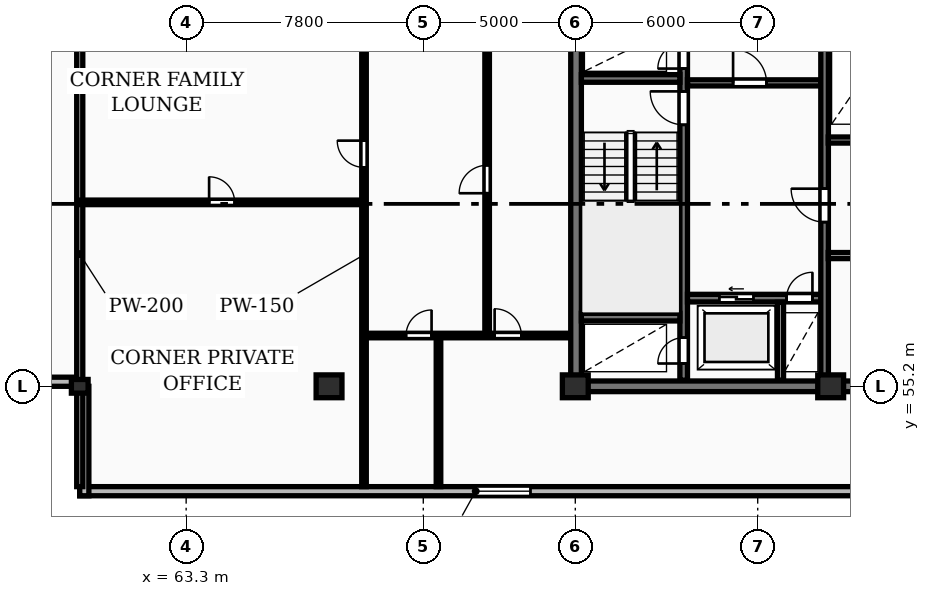
"""IFC4 building model, lengths in metres.
Left out: names, types, materials, properties, quantities, classifications, styles, units other than length and angle.
Written with IfcOpenShell. Run it as: python <this file> out.ifc"""

import sys

from ifc_helpers import new_model, si_unit, direction, frame, frame_2d, origin, origin_2d, place, context, subcontext, project, spatial, rectangle, extrude, element, fill, save


model = new_model("IFC4")
c1 = context("Model", 3, precision=1e-05, world=origin(), true_north=direction((0.0, 1.0)))
c2 = subcontext(c1, "Body", "Model", "MODEL_VIEW")
j1 = project(units=[si_unit("LENGTHUNIT", "METRE"), si_unit("PLANEANGLEUNIT", "RADIAN")], contexts=[c1])
p1 = place(None, origin())
s1 = spatial("IfcSite", under=j1, at=p1, CompositionType="ELEMENT")
p2 = place(p1, origin())
s2 = spatial("IfcBuilding", under=s1, at=p2, CompositionType="ELEMENT")
p3 = place(p2, frame((0.0, 0.0, 207.6)))
s3 = spatial("IfcBuildingStorey", under=s2, at=p3, CompositionType="ELEMENT", Elevation=207.6)
p4 = place(p3, frame((59.8, 55.2, 0.0), z_axis=(0.0, 0.0, 1.0), x_axis=(1.0, 0.0, 0.0)))
e1 = element("IfcColumn", 1, at=p4, inside=s3, PredefinedType="PILASTER", context=c2, shape_type="SweptSolid", body=[
    extrude(rectangle(XDim=0.55, YDim=0.45, at=origin_2d()), origin(), (0.0, 0.0, 1.0), 3.25),
])
for number, where, z_axis, x_axis in (
    (2, (68.0, 55.2, 0.0), (0.0, 0.0, 1.0), (1.0, 0.0, 0.0)),
    (3, (76.1, 55.2, 0.0), (0.0, 0.0, 1.0), (1.0, 0.0, 0.0)),
    (4, (84.5, 55.2, 0.0), (0.0, 0.0, 1.0), (1.0, 0.0, 0.0)),
):
    element("IfcColumn", number, at=place(p3, frame(where, z_axis=z_axis, x_axis=x_axis)), inside=s3, PredefinedType="COLUMN", context=c2, shape_type="SweptSolid", body=[
        extrude(rectangle(XDim=0.85, YDim=0.75, at=origin_2d()), origin(), (0.0, 0.0, 1.0), 3.25),
    ])
p5 = place(p3, frame((59.8, 51.75, 0.0), z_axis=(0.0, 0.0, 1.0), x_axis=(1.0, 0.0, 0.0)))
e5 = element("IfcWall", 5, at=p5, inside=s3, PredefinedType="STANDARD", context=c2, shape_type="SweptSolid", body=[
    extrude(rectangle(XDim=68.6, YDim=0.3, at=frame_2d((34.3, 0.0))), origin(), (0.0, 0.0, 1.0), 2.97),
])
p6 = place(p5, frame((13.025, 0.0, 0.85)))
e6 = element("IfcOpeningElement", 6, at=p6, cuts=e5, PredefinedType="OPENING", context=c2, shape_type="SweptSolid", body=[
    extrude(rectangle(XDim=1.8, YDim=1.8, at=frame_2d((0.9, 0.9))), frame((0.0, 0.16, 0.0), z_axis=(0.0, -1.0, 0.0), x_axis=(1.0, 0.0, 0.0)), (0.0, 0.0, 1.0), 0.32),
])
p7 = place(p5, frame((56.375, 0.0, 0.85)))
e7 = element("IfcOpeningElement", 7, at=p7, cuts=e5, PredefinedType="OPENING", context=c2, shape_type="SweptSolid", body=[
    extrude(rectangle(XDim=1.8, YDim=1.8, at=frame_2d((0.9, 0.9))), frame((0.0, 0.16, 0.0), z_axis=(0.0, -1.0, 0.0), x_axis=(1.0, 0.0, 0.0)), (0.0, 0.0, 1.0), 0.32),
])
p8 = place(p3, frame((56.2, 55.35, 0.0), z_axis=(0.0, 0.0, 1.0), x_axis=(1.0, 0.0, 0.0)))
e8 = element("IfcWall", 8, at=p8, inside=s3, PredefinedType="STANDARD", context=c2, shape_type="SweptSolid", body=[
    extrude(rectangle(XDim=3.6, YDim=0.3, at=frame_2d((1.8, 0.0))), origin(), (0.0, 0.0, 1.0), 2.97),
])
p9 = place(p3, frame((59.95, 55.2, 0.0), z_axis=(0.0, 0.0, 1.0), x_axis=(0.0, -1.0, 0.0)))
e9 = element("IfcWall", 9, at=p9, inside=s3, PredefinedType="STANDARD", context=c2, shape_type="SweptSolid", body=[
    extrude(rectangle(XDim=3.6, YDim=0.3, at=frame_2d((1.8, 0.0))), origin(), (0.0, 0.0, 1.0), 2.97),
])
p10 = place(p3, frame((75.95, 55.2, 0.0), z_axis=(0.0, 0.0, 1.0), x_axis=(1.0, 0.0, 0.0)))
e10 = element("IfcWall", 10, at=p10, inside=s3, PredefinedType="SHEAR", context=c2, shape_type="SweptSolid", body=[
    extrude(rectangle(XDim=36.3, YDim=0.35, at=frame_2d((18.15, 0.0))), origin(), (0.0, 0.0, 1.0), 3.25),
])
p11 = place(p3, frame((76.125, 55.375, 0.0), z_axis=(0.0, 0.0, 1.0), x_axis=(0.0, 1.0, 0.0)))
e11 = element("IfcWall", 11, at=p11, inside=s3, PredefinedType="SHEAR", context=c2, shape_type="SweptSolid", body=[
    extrude(rectangle(XDim=11.65, YDim=0.35, at=frame_2d((5.825, 0.0))), origin(), (0.0, 0.0, 1.0), 3.25),
])
p12 = place(p3, frame((79.665, 55.4, 0.0), z_axis=(0.0, 0.0, 1.0), x_axis=(0.0, 1.0, 0.0)))
e12 = element("IfcWall", 12, at=p12, inside=s3, PredefinedType="SHEAR", context=c2, shape_type="SweptSolid", body=[
    extrude(rectangle(XDim=11.6, YDim=0.25, at=frame_2d((5.8, 0.0))), origin(), (0.0, 0.0, 1.0), 3.25),
])
p13 = place(p12, frame((0.55, 0.0, 0.0)))
e13 = element("IfcOpeningElement", 13, at=p13, cuts=e12, PredefinedType="OPENING", context=c2, shape_type="SweptSolid", body=[
    extrude(rectangle(XDim=0.85, YDim=2.05, at=frame_2d((0.425, 1.025))), frame((0.0, 0.135, 0.0), z_axis=(0.0, -1.0, 0.0), x_axis=(1.0, 0.0, 0.0)), (0.0, 0.0, 1.0), 0.27),
])
p14 = place(p12, frame((8.4, 0.0, 0.0)))
e14 = element("IfcOpeningElement", 14, at=p14, cuts=e12, PredefinedType="OPENING", context=c2, shape_type="SweptSolid", body=[
    extrude(rectangle(XDim=1.1, YDim=2.1, at=frame_2d((0.55, 1.05))), frame((0.0, 0.135, 0.0), z_axis=(0.0, -1.0, 0.0), x_axis=(1.0, 0.0, 0.0)), (0.0, 0.0, 1.0), 0.27),
])
p15 = place(p12, frame((10.25, 0.0, 0.0)))
e15 = element("IfcOpeningElement", 15, at=p15, cuts=e12, PredefinedType="OPENING", context=c2, shape_type="SweptSolid", body=[
    extrude(rectangle(XDim=0.85, YDim=2.05, at=frame_2d((0.425, 1.025))), frame((0.0, 0.135, 0.0), z_axis=(0.0, -1.0, 0.0), x_axis=(1.0, 0.0, 0.0)), (0.0, 0.0, 1.0), 0.27),
])
for number, where, z_axis, x_axis in (
    (16, (76.3, 57.475, 0.0), (0.0, 0.0, 1.0), (1.0, 0.0, 0.0)),
    (17, (76.3, 65.325, 0.0), (0.0, 0.0, 1.0), (1.0, 0.0, 0.0)),
):
    element("IfcWall", number, at=place(p3, frame(where, z_axis=z_axis, x_axis=x_axis)), inside=s3, PredefinedType="SHEAR", context=c2, shape_type="SweptSolid", body=[
        extrude(rectangle(XDim=3.24, YDim=0.25, at=frame_2d((1.62, 0.0))), origin(), (0.0, 0.0, 1.0), 3.25),
    ])
p16 = place(p3, frame((79.79, 58.1, 0.0), z_axis=(0.0, 0.0, 1.0), x_axis=(1.0, 0.0, 0.0)))
e18 = element("IfcWall", 18, at=p16, inside=s3, PredefinedType="SHEAR", context=c2, shape_type="SweptSolid", body=[
    extrude(rectangle(XDim=4.39, YDim=0.25, at=frame_2d((2.195, 0.0))), origin(), (0.0, 0.0, 1.0), 3.25),
])
p17 = place(p16, frame((1.05, 0.0, 0.0)))
e19 = element("IfcOpeningElement", 19, at=p17, cuts=e18, PredefinedType="OPENING", context=c2, shape_type="SweptSolid", body=[
    extrude(rectangle(XDim=1.12, YDim=2.12, at=frame_2d((0.56, 1.06))), frame((0.0, 0.135, 0.0), z_axis=(0.0, -1.0, 0.0), x_axis=(1.0, 0.0, 0.0)), (0.0, 0.0, 1.0), 0.27),
])
p18 = place(p16, frame((3.26, 0.0, 0.0)))
e20 = element("IfcOpeningElement", 20, at=p18, cuts=e18, PredefinedType="OPENING", context=c2, shape_type="SweptSolid", body=[
    extrude(rectangle(XDim=0.85, YDim=2.05, at=frame_2d((0.425, 1.025))), frame((0.0, 0.135, 0.0), z_axis=(0.0, -1.0, 0.0), x_axis=(1.0, 0.0, 0.0)), (0.0, 0.0, 1.0), 0.27),
])
p19 = place(p3, frame((82.85, 55.4, 0.0), z_axis=(0.0, 0.0, 1.0), x_axis=(0.0, 1.0, 0.0)))
e21 = element("IfcWall", 21, at=p19, inside=s3, PredefinedType="PARTITIONING", context=c2, shape_type="SweptSolid", body=[
    extrude(rectangle(XDim=2.56, YDim=0.2, at=frame_2d((1.28, 0.0))), origin(), (0.0, 0.0, 1.0), 2.97),
])
p20 = place(p3, frame((79.79, 65.18, 0.0), z_axis=(0.0, 0.0, 1.0), x_axis=(1.0, 0.0, 0.0)))
e22 = element("IfcWall", 22, at=p20, inside=s3, PredefinedType="PARTITIONING", context=c2, shape_type="SweptSolid", body=[
    extrude(rectangle(XDim=4.39, YDim=0.2, at=frame_2d((2.195, 0.0))), origin(), (0.0, 0.0, 1.0), 2.97),
])
p21 = place(p20, frame((1.5, 0.0, 0.0)))
e23 = element("IfcOpeningElement", 23, at=p21, cuts=e22, PredefinedType="OPENING", context=c2, shape_type="SweptSolid", body=[
    extrude(rectangle(XDim=1.1, YDim=2.1, at=frame_2d((0.55, 1.05))), frame((0.0, 0.11, 0.0), z_axis=(0.0, -1.0, 0.0), x_axis=(1.0, 0.0, 0.0)), (0.0, 0.0, 1.0), 0.22),
])
p22 = place(p3, frame((84.3, 55.4, 0.0), z_axis=(0.0, 0.0, 1.0), x_axis=(0.0, 1.0, 0.0)))
e24 = element("IfcWall", 24, at=p22, inside=s3, PredefinedType="SHEAR", context=c2, shape_type="SweptSolid", body=[
    extrude(rectangle(XDim=11.6, YDim=0.25, at=frame_2d((5.8, 0.0))), origin(), (0.0, 0.0, 1.0), 3.25),
])
p23 = place(p22, frame((5.2, 0.0, 0.0)))
e25 = element("IfcOpeningElement", 25, at=p23, cuts=e24, PredefinedType="OPENING", context=c2, shape_type="SweptSolid", body=[
    extrude(rectangle(XDim=1.1, YDim=2.1, at=frame_2d((0.55, 1.05))), frame((0.0, 0.135, 0.0), z_axis=(0.0, -1.0, 0.0), x_axis=(1.0, 0.0, 0.0)), (0.0, 0.0, 1.0), 0.27),
])
p24 = place(p3, frame((84.42, 59.5, 0.0), z_axis=(0.0, 0.0, 1.0), x_axis=(1.0, 0.0, 0.0)))
e26 = element("IfcWall", 26, at=p24, inside=s3, PredefinedType="PARTITIONING", context=c2, shape_type="SweptSolid", body=[
    extrude(rectangle(XDim=8.36, YDim=0.2, at=frame_2d((4.18, 0.0))), origin(), (0.0, 0.0, 1.0), 2.97),
])
p25 = place(p24, frame((3.4, 0.0, 0.0)))
e27 = element("IfcOpeningElement", 27, at=p25, cuts=e26, PredefinedType="OPENING", context=c2, shape_type="SweptSolid", body=[
    extrude(rectangle(XDim=0.92, YDim=2.08, at=frame_2d((0.46, 1.04))), frame((0.0, 0.11, 0.0), z_axis=(0.0, -1.0, 0.0), x_axis=(1.0, 0.0, 0.0)), (0.0, 0.0, 1.0), 0.22),
])
p26 = place(p3, frame((84.42, 63.3, 0.0), z_axis=(0.0, 0.0, 1.0), x_axis=(1.0, 0.0, 0.0)))
e28 = element("IfcWall", 28, at=p26, inside=s3, PredefinedType="PARTITIONING", context=c2, shape_type="SweptSolid", body=[
    extrude(rectangle(XDim=19.83, YDim=0.2, at=frame_2d((9.915, 0.0))), origin(), (0.0, 0.0, 1.0), 2.97),
])
p27 = place(p26, frame((1.15, 0.0, 0.0)))
e29 = element("IfcOpeningElement", 29, at=p27, cuts=e28, PredefinedType="OPENING", context=c2, shape_type="SweptSolid", body=[
    extrude(rectangle(XDim=0.85, YDim=2.05, at=frame_2d((0.425, 1.025))), frame((0.0, 0.11, 0.0), z_axis=(0.0, -1.0, 0.0), x_axis=(1.0, 0.0, 0.0)), (0.0, 0.0, 1.0), 0.22),
])
p28 = place(p26, frame((3.25, 0.0, 0.0)))
e30 = element("IfcOpeningElement", 30, at=p28, cuts=e28, PredefinedType="OPENING", context=c2, shape_type="SweptSolid", body=[
    extrude(rectangle(XDim=0.85, YDim=2.05, at=frame_2d((0.425, 1.025))), frame((0.0, 0.11, 0.0), z_axis=(0.0, -1.0, 0.0), x_axis=(1.0, 0.0, 0.0)), (0.0, 0.0, 1.0), 0.22),
])
p29 = place(p26, frame((13.08, 0.0, 0.0)))
e31 = element("IfcOpeningElement", 31, at=p29, cuts=e28, PredefinedType="OPENING", context=c2, shape_type="SweptSolid", body=[
    extrude(rectangle(XDim=1.5, YDim=2.2, at=frame_2d((0.75, 1.1))), frame((0.0, 0.11, 0.0), z_axis=(0.0, -1.0, 0.0), x_axis=(1.0, 0.0, 0.0)), (0.0, 0.0, 1.0), 0.22),
])
p30 = place(p26, frame((6.78, 0.0, 0.0)))
e32 = element("IfcOpeningElement", 32, at=p30, cuts=e28, PredefinedType="OPENING", context=c2, shape_type="SweptSolid", body=[
    extrude(rectangle(XDim=0.92, YDim=2.08, at=frame_2d((0.46, 1.04))), frame((0.0, 0.11, 0.0), z_axis=(0.0, -1.0, 0.0), x_axis=(1.0, 0.0, 0.0)), (0.0, 0.0, 1.0), 0.22),
])
p31 = place(p26, frame((16.28, 0.0, 0.0)))
e33 = element("IfcOpeningElement", 33, at=p31, cuts=e28, PredefinedType="OPENING", context=c2, shape_type="SweptSolid", body=[
    extrude(rectangle(XDim=0.92, YDim=2.08, at=frame_2d((0.46, 1.04))), frame((0.0, 0.11, 0.0), z_axis=(0.0, -1.0, 0.0), x_axis=(1.0, 0.0, 0.0)), (0.0, 0.0, 1.0), 0.22),
])
p32 = place(p3, frame((59.8, 51.9, 0.0), z_axis=(0.0, 0.0, 1.0), x_axis=(0.0, 1.0, 0.0)))
e34 = element("IfcWall", 34, at=p32, inside=s3, PredefinedType="PARTITIONING", context=c2, shape_type="SweptSolid", body=[
    extrude(rectangle(XDim=15.3, YDim=0.2, at=frame_2d((7.65, 0.0))), origin(), (0.0, 0.0, 1.0), 2.277),
])
p33 = place(p3, frame((59.8, 61.25, 0.0), z_axis=(0.0, 0.0, 1.0), x_axis=(1.0, 0.0, 0.0)))
e35 = element("IfcWall", 35, at=p33, inside=s3, PredefinedType="PARTITIONING", context=c2, shape_type="SweptSolid", body=[
    extrude(rectangle(XDim=9.35, YDim=0.15, at=frame_2d((4.675, 0.0))), origin(), (0.0, 0.0, 1.0), 2.97),
])
p34 = place(p33, frame((4.255, 0.0, 0.0)))
e36 = element("IfcOpeningElement", 36, at=p34, cuts=e35, PredefinedType="OPENING", context=c2, shape_type="SweptSolid", body=[
    extrude(rectangle(XDim=0.84, YDim=2.04, at=frame_2d((0.42, 1.02))), frame((0.0, 0.085, 0.0), z_axis=(0.0, -1.0, 0.0), x_axis=(1.0, 0.0, 0.0)), (0.0, 0.0, 1.0), 0.17),
])
p35 = place(p3, frame((69.15, 51.9, 0.0), z_axis=(0.0, 0.0, 1.0), x_axis=(0.0, 1.0, 0.0)))
e37 = element("IfcWall", 37, at=p35, inside=s3, PredefinedType="PARTITIONING", context=c2, shape_type="SweptSolid", body=[
    extrude(rectangle(XDim=15.25, YDim=0.15, at=frame_2d((7.625, 0.0))), origin(), (0.0, 0.0, 1.0), 2.97),
])
p36 = place(p35, frame((10.5, 0.0, 0.0)))
e38 = element("IfcOpeningElement", 38, at=p36, cuts=e37, PredefinedType="OPENING", context=c2, shape_type="SweptSolid", body=[
    extrude(rectangle(XDim=0.88, YDim=2.06, at=frame_2d((0.44, 1.03))), frame((0.0, 0.085, 0.0), z_axis=(0.0, -1.0, 0.0), x_axis=(1.0, 0.0, 0.0)), (0.0, 0.0, 1.0), 0.17),
])
p37 = place(p3, frame((73.2, 56.87, 0.0), z_axis=(0.0, 0.0, 1.0), x_axis=(0.0, 1.0, 0.0)))
e39 = element("IfcWall", 39, at=p37, inside=s3, PredefinedType="PARTITIONING", context=c2, shape_type="SweptSolid", body=[
    extrude(rectangle(XDim=10.28, YDim=0.15, at=frame_2d((5.14, 0.0))), origin(), (0.0, 0.0, 1.0), 2.97),
])
p38 = place(p37, frame((4.68, 0.0, 0.0)))
e40 = element("IfcOpeningElement", 40, at=p38, cuts=e39, PredefinedType="OPENING", context=c2, shape_type="SweptSolid", body=[
    extrude(rectangle(XDim=0.92, YDim=2.08, at=frame_2d((0.46, 1.04))), frame((0.0, 0.085, 0.0), z_axis=(0.0, -1.0, 0.0), x_axis=(1.0, 0.0, 0.0)), (0.0, 0.0, 1.0), 0.17),
])
p39 = place(p3, frame((71.6, 51.9, 0.0), z_axis=(0.0, 0.0, 1.0), x_axis=(0.0, 1.0, 0.0)))
e41 = element("IfcWall", 41, at=p39, inside=s3, PredefinedType="PARTITIONING", context=c2, shape_type="SweptSolid", body=[
    extrude(rectangle(XDim=4.97, YDim=0.15, at=frame_2d((2.485, 0.0))), origin(), (0.0, 0.0, 1.0), 2.97),
])
p40 = place(p3, frame((69.17, 56.87, 0.0), z_axis=(0.0, 0.0, 1.0), x_axis=(1.0, 0.0, 0.0)))
e42 = element("IfcWall", 42, at=p40, inside=s3, PredefinedType="PARTITIONING", context=c2, shape_type="SweptSolid", body=[
    extrude(rectangle(XDim=6.76, YDim=0.15, at=frame_2d((3.38, 0.0))), origin(), (0.0, 0.0, 1.0), 2.97),
])
p41 = place(p40, frame((1.362, 0.0, 0.0)))
e43 = element("IfcOpeningElement", 43, at=p41, cuts=e42, PredefinedType="OPENING", context=c2, shape_type="SweptSolid", body=[
    extrude(rectangle(XDim=0.84, YDim=2.04, at=frame_2d((0.42, 1.02))), frame((0.0, 0.085, 0.0), z_axis=(0.0, -1.0, 0.0), x_axis=(1.0, 0.0, 0.0)), (0.0, 0.0, 1.0), 0.17),
])
p42 = place(p40, frame((4.277, 0.0, 0.0)))
e44 = element("IfcOpeningElement", 44, at=p42, cuts=e42, PredefinedType="OPENING", context=c2, shape_type="SweptSolid", body=[
    extrude(rectangle(XDim=0.88, YDim=2.06, at=frame_2d((0.44, 1.03))), frame((0.0, 0.085, 0.0), z_axis=(0.0, -1.0, 0.0), x_axis=(1.0, 0.0, 0.0)), (0.0, 0.0, 1.0), 0.17),
])
p43 = place(p6, origin())
e45 = element("IfcWindow", 45, at=p43, inside=s3, PartitioningType="SINGLE_PANEL", PredefinedType="WINDOW", context=c2, shape_type="SweptSolid", body=[
    extrude(rectangle(XDim=1.8, YDim=1.8, at=frame_2d((0.9, 0.9))), frame((0.0, 0.03, 0.0), z_axis=(0.0, -1.0, 0.0), x_axis=(1.0, 0.0, 0.0)), (0.0, 0.0, 1.0), 0.06),
])
fill(e6, e45)
p44 = place(p13, origin())
e46 = element("IfcDoor", 46, at=p44, inside=s3, OperationType="SINGLE_SWING_LEFT", PredefinedType="DOOR", context=c2, shape_type="SweptSolid", body=[
    extrude(rectangle(XDim=0.85, YDim=2.05, at=frame_2d((0.425, 1.025))), frame((0.0, 0.025, 0.0), z_axis=(0.0, -1.0, 0.0), x_axis=(1.0, 0.0, 0.0)), (0.0, 0.0, 1.0), 0.05),
])
fill(e13, e46)
p45 = place(p14, origin())
e47 = element("IfcDoor", 47, at=p45, inside=s3, OperationType="SINGLE_SWING_RIGHT", PredefinedType="DOOR", context=c2, shape_type="SweptSolid", body=[
    extrude(rectangle(XDim=1.1, YDim=2.1, at=frame_2d((0.55, 1.05))), frame((0.0, 0.025, 0.0), z_axis=(0.0, -1.0, 0.0), x_axis=(1.0, 0.0, 0.0)), (0.0, 0.0, 1.0), 0.05),
])
fill(e14, e47)
p46 = place(p15, origin())
e48 = element("IfcDoor", 48, at=p46, inside=s3, OperationType="SINGLE_SWING_LEFT", PredefinedType="DOOR", context=c2, shape_type="SweptSolid", body=[
    extrude(rectangle(XDim=0.85, YDim=2.05, at=frame_2d((0.425, 1.025))), frame((0.0, 0.025, 0.0), z_axis=(0.0, -1.0, 0.0), x_axis=(1.0, 0.0, 0.0)), (0.0, 0.0, 1.0), 0.05),
])
fill(e15, e48)
p47 = place(p17, origin())
e49 = element("IfcDoor", 49, at=p47, inside=s3, OperationType="SLIDING_TO_LEFT", PredefinedType="DOOR", context=c2, shape_type="SweptSolid", body=[
    extrude(rectangle(XDim=1.12, YDim=2.12, at=frame_2d((0.56, 1.06))), frame((0.0, 0.025, 0.0), z_axis=(0.0, -1.0, 0.0), x_axis=(1.0, 0.0, 0.0)), (0.0, 0.0, 1.0), 0.05),
])
fill(e19, e49)
p48 = place(p18, origin())
e50 = element("IfcDoor", 50, at=p48, inside=s3, OperationType="SINGLE_SWING_RIGHT", PredefinedType="DOOR", context=c2, shape_type="SweptSolid", body=[
    extrude(rectangle(XDim=0.85, YDim=2.05, at=frame_2d((0.425, 1.025))), frame((0.0, 0.025, 0.0), z_axis=(0.0, -1.0, 0.0), x_axis=(1.0, 0.0, 0.0)), (0.0, 0.0, 1.0), 0.05),
])
fill(e20, e50)
p49 = place(p21, origin())
e51 = element("IfcDoor", 51, at=p49, inside=s3, OperationType="SINGLE_SWING_LEFT", PredefinedType="DOOR", context=c2, shape_type="SweptSolid", body=[
    extrude(rectangle(XDim=1.1, YDim=2.1, at=frame_2d((0.55, 1.05))), frame((0.0, 0.025, 0.0), z_axis=(0.0, -1.0, 0.0), x_axis=(1.0, 0.0, 0.0)), (0.0, 0.0, 1.0), 0.05),
])
fill(e23, e51)
p50 = place(p23, origin())
e52 = element("IfcDoor", 52, at=p50, inside=s3, OperationType="SINGLE_SWING_RIGHT", PredefinedType="DOOR", context=c2, shape_type="SweptSolid", body=[
    extrude(rectangle(XDim=1.1, YDim=2.1, at=frame_2d((0.55, 1.05))), frame((0.0, 0.025, 0.0), z_axis=(0.0, -1.0, 0.0), x_axis=(1.0, 0.0, 0.0)), (0.0, 0.0, 1.0), 0.05),
])
fill(e25, e52)
p51 = place(p34, origin())
e53 = element("IfcDoor", 53, at=p51, inside=s3, OperationType="SINGLE_SWING_LEFT", PredefinedType="DOOR", context=c2, shape_type="SweptSolid", body=[
    extrude(rectangle(XDim=0.84, YDim=2.04, at=frame_2d((0.42, 1.02))), frame((0.0, 0.025, 0.0), z_axis=(0.0, -1.0, 0.0), x_axis=(1.0, 0.0, 0.0)), (0.0, 0.0, 1.0), 0.05),
])
fill(e36, e53)
p52 = place(p36, origin())
e54 = element("IfcDoor", 54, at=p52, inside=s3, OperationType="SINGLE_SWING_RIGHT", PredefinedType="DOOR", context=c2, shape_type="SweptSolid", body=[
    extrude(rectangle(XDim=0.88, YDim=2.06, at=frame_2d((0.44, 1.03))), frame((0.0, 0.025, 0.0), z_axis=(0.0, -1.0, 0.0), x_axis=(1.0, 0.0, 0.0)), (0.0, 0.0, 1.0), 0.05),
])
fill(e38, e54)
p53 = place(p38, origin())
e55 = element("IfcDoor", 55, at=p53, inside=s3, OperationType="SINGLE_SWING_LEFT", PredefinedType="DOOR", context=c2, shape_type="SweptSolid", body=[
    extrude(rectangle(XDim=0.92, YDim=2.08, at=frame_2d((0.46, 1.04))), frame((0.0, 0.025, 0.0), z_axis=(0.0, -1.0, 0.0), x_axis=(1.0, 0.0, 0.0)), (0.0, 0.0, 1.0), 0.05),
])
fill(e40, e55)
p54 = place(p41, origin())
e56 = element("IfcDoor", 56, at=p54, inside=s3, OperationType="SINGLE_SWING_RIGHT", PredefinedType="DOOR", context=c2, shape_type="SweptSolid", body=[
    extrude(rectangle(XDim=0.84, YDim=2.04, at=frame_2d((0.42, 1.02))), frame((0.0, 0.025, 0.0), z_axis=(0.0, -1.0, 0.0), x_axis=(1.0, 0.0, 0.0)), (0.0, 0.0, 1.0), 0.05),
])
fill(e43, e56)
p55 = place(p42, origin())
e57 = element("IfcDoor", 57, at=p55, inside=s3, OperationType="SINGLE_SWING_LEFT", PredefinedType="DOOR", context=c2, shape_type="SweptSolid", body=[
    extrude(rectangle(XDim=0.88, YDim=2.06, at=frame_2d((0.44, 1.03))), frame((0.0, 0.025, 0.0), z_axis=(0.0, -1.0, 0.0), x_axis=(1.0, 0.0, 0.0)), (0.0, 0.0, 1.0), 0.05),
])
fill(e44, e57)
save(model, sys.argv[1])
